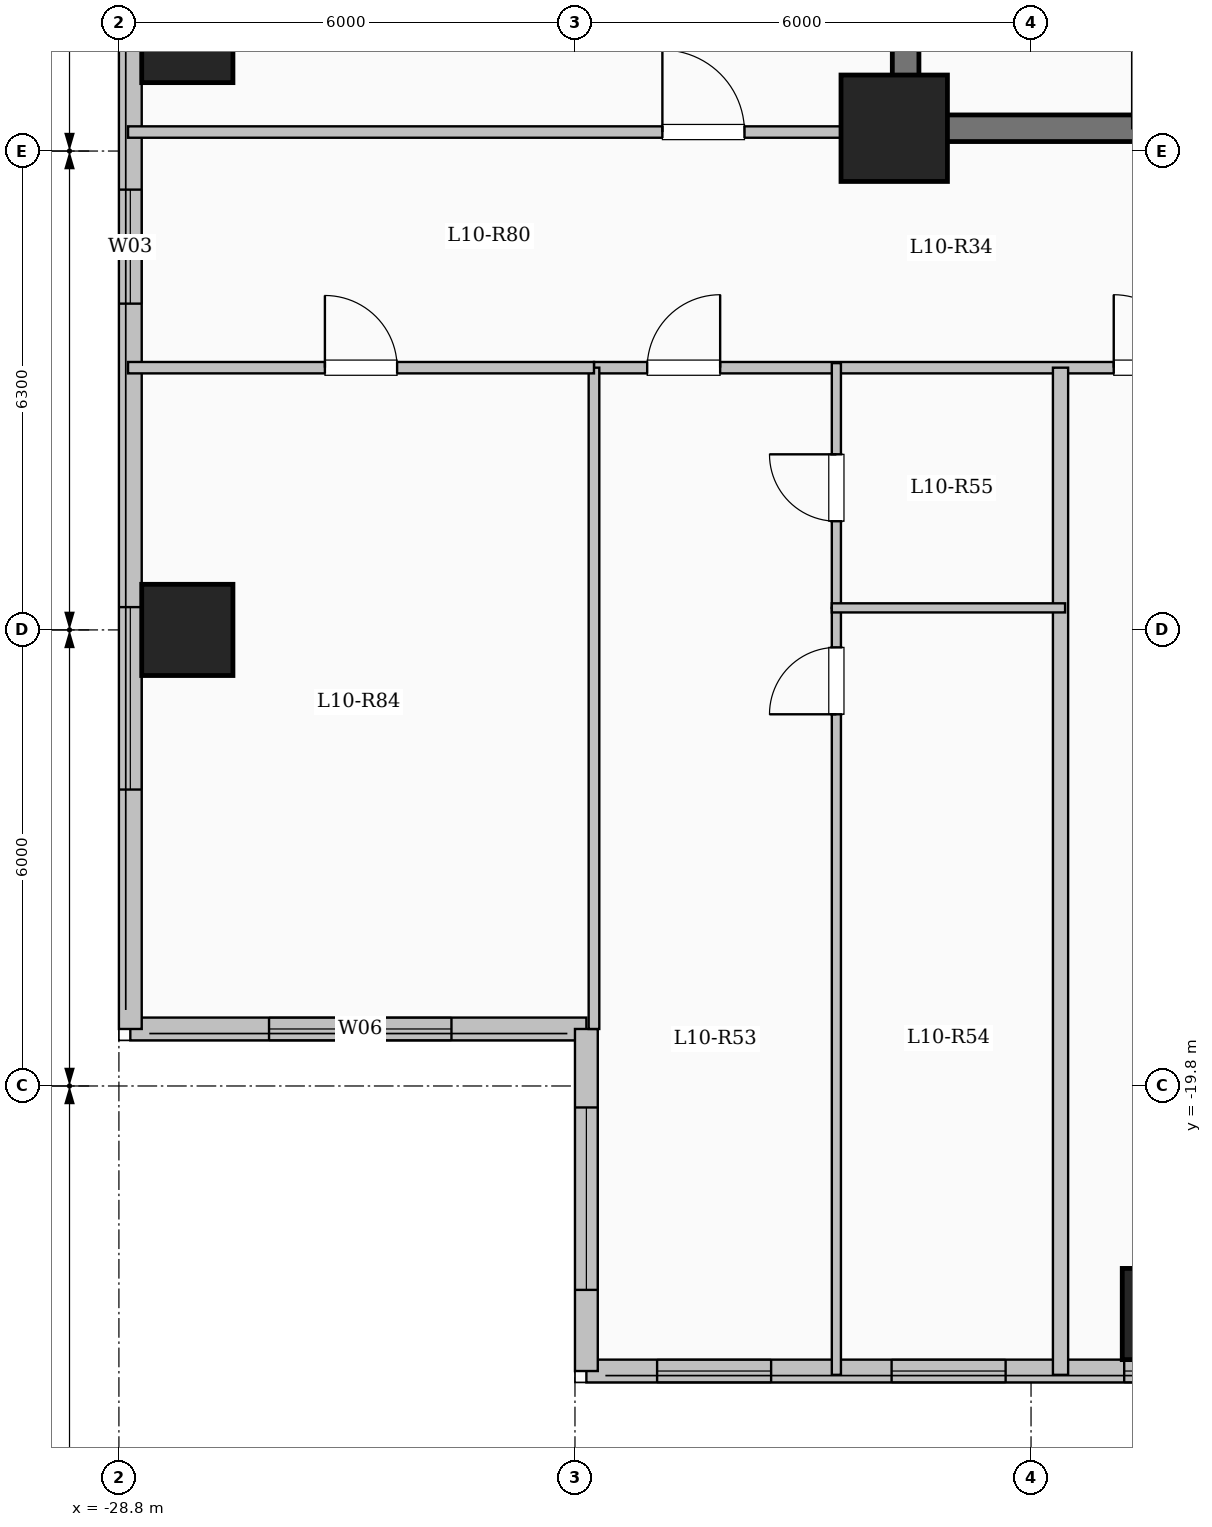
"""IFC4 building model, lengths in metres.
Left out: names, types, materials, properties, quantities, classifications, styles, units other than length and angle.
Written with IfcOpenShell. Run it as: python <this file> out.ifc"""

import sys

from ifc_helpers import new_model, si_unit, direction, frame, frame_2d, origin, origin_2d, place, context, subcontext, project, spatial, rectangle, extrude, element, fill, save


model = new_model("IFC4")
c1 = context("Model", 3, precision=1e-05, world=origin(), true_north=direction((0.0, 1.0)))
c2 = subcontext(c1, "Body", "Model", "MODEL_VIEW")
j1 = project(units=[si_unit("LENGTHUNIT", "METRE"), si_unit("PLANEANGLEUNIT", "RADIAN")], contexts=[c1])
p1 = place(None, origin())
s1 = spatial("IfcSite", under=j1, at=p1, CompositionType="ELEMENT")
p2 = place(p1, origin())
s2 = spatial("IfcBuilding", under=s1, at=p2, CompositionType="ELEMENT")
p3 = place(p2, frame((0.0, 0.0, 40.75)))
s3 = spatial("IfcBuildingStorey", under=s2, at=p3, CompositionType="ELEMENT", Elevation=40.75)
p4 = place(p3, frame((-18.6, -7.2, 0.0), z_axis=(0.0, 0.0, 1.0), x_axis=(1.0, 0.0, 0.0)))
e1 = element("IfcColumn", 1, at=p4, inside=s3, PredefinedType="COLUMN", context=c2, shape_type="SweptSolid", body=[
    extrude(rectangle(XDim=1.4, YDim=1.4, at=origin_2d()), origin(), (0.0, 0.0, 1.0), 3.35),
])
for number, where, z_axis, x_axis in (
    (2, (-15.0, -22.8, 0.0), (0.0, 0.0, 1.0), (1.0, 0.0, 0.0)),
    (3, (-27.9, -13.8, 0.0), (0.0, 0.0, 1.0), (1.0, 0.0, 0.0)),
    (4, (-27.9, -6.0, 0.0), (0.0, 0.0, 1.0), (1.0, 0.0, 0.0)),
):
    element("IfcColumn", number, at=place(p3, frame(where, z_axis=z_axis, x_axis=x_axis)), inside=s3, PredefinedType="COLUMN", context=c2, shape_type="SweptSolid", body=[
        extrude(rectangle(XDim=1.2, YDim=1.2, at=origin_2d()), origin(), (0.0, 0.0, 1.0), 3.35),
    ])
p5 = place(p3, frame((-22.65, -19.05, 0.0), z_axis=(0.0, 0.0, 1.0), x_axis=(-1.0, 0.0, 0.0)))
e5 = element("IfcWall", 5, at=p5, inside=s3, PredefinedType="SOLIDWALL", context=c2, shape_type="SweptSolid", body=[
    extrude(rectangle(XDim=6.0, YDim=0.3, at=frame_2d((3.0, 0.0))), origin(), (0.0, 0.0, 1.0), 3.1),
])
p6 = place(p5, frame((1.775, 0.0, 0.9)))
e6 = element("IfcOpeningElement", 6, at=p6, cuts=e5, PredefinedType="OPENING", context=c2, shape_type="SweptSolid", body=[
    extrude(rectangle(XDim=2.4, YDim=1.8, at=frame_2d((1.2, 0.9))), frame((0.0, 0.16, 0.0), z_axis=(0.0, -1.0, 0.0), x_axis=(1.0, 0.0, 0.0)), (0.0, 0.0, 1.0), 0.32),
])
p7 = place(p3, frame((-28.65, -19.05, 0.0), z_axis=(0.0, 0.0, 1.0), x_axis=(0.0, 1.0, 0.0)))
e7 = element("IfcWall", 7, at=p7, inside=s3, PredefinedType="SOLIDWALL", context=c2, shape_type="SweptSolid", body=[
    extrude(rectangle(XDim=38.1, YDim=0.3, at=frame_2d((19.05, 0.0))), origin(), (0.0, 0.0, 1.0), 3.1),
])
p8 = place(p7, frame((3.15, 0.0, 0.9)))
e8 = element("IfcOpeningElement", 8, at=p8, cuts=e7, PredefinedType="OPENING", context=c2, shape_type="SweptSolid", body=[
    extrude(rectangle(XDim=2.4, YDim=1.8, at=frame_2d((1.2, 0.9))), frame((0.0, 0.16, 0.0), z_axis=(0.0, -1.0, 0.0), x_axis=(1.0, 0.0, 0.0)), (0.0, 0.0, 1.0), 0.32),
])
p9 = place(p7, frame((9.542, 0.0, 0.9)))
e9 = element("IfcOpeningElement", 9, at=p9, cuts=e7, PredefinedType="OPENING", context=c2, shape_type="SweptSolid", body=[
    extrude(rectangle(XDim=1.5, YDim=1.65, at=frame_2d((0.75, 0.825))), frame((0.0, 0.16, 0.0), z_axis=(0.0, -1.0, 0.0), x_axis=(1.0, 0.0, 0.0)), (0.0, 0.0, 1.0), 0.32),
])
p10 = place(p7, frame((19.8, 0.0, 0.9)))
e10 = element("IfcOpeningElement", 10, at=p10, cuts=e7, PredefinedType="OPENING", context=c2, shape_type="SweptSolid", body=[
    extrude(rectangle(XDim=2.0, YDim=1.7, at=frame_2d((1.0, 0.85))), frame((0.0, 0.16, 0.0), z_axis=(0.0, -1.0, 0.0), x_axis=(1.0, 0.0, 0.0)), (0.0, 0.0, 1.0), 0.32),
])
p11 = place(p7, frame((30.175, 0.0, 0.95)))
e11 = element("IfcOpeningElement", 11, at=p11, cuts=e7, PredefinedType="OPENING", context=c2, shape_type="SweptSolid", body=[
    extrude(rectangle(XDim=1.0, YDim=1.5, at=frame_2d((0.5, 0.75))), frame((0.0, 0.16, 0.0), z_axis=(0.0, -1.0, 0.0), x_axis=(1.0, 0.0, 0.0)), (0.0, 0.0, 1.0), 0.32),
])
p12 = place(p7, frame((33.85, 0.0, 0.9)))
e12 = element("IfcOpeningElement", 12, at=p12, cuts=e7, PredefinedType="OPENING", context=c2, shape_type="SweptSolid", body=[
    extrude(rectangle(XDim=2.0, YDim=1.7, at=frame_2d((1.0, 0.85))), frame((0.0, 0.16, 0.0), z_axis=(0.0, -1.0, 0.0), x_axis=(1.0, 0.0, 0.0)), (0.0, 0.0, 1.0), 0.32),
])
p13 = place(p3, frame((-7.35, -23.55, 0.0), z_axis=(0.0, 0.0, 1.0), x_axis=(-1.0, 0.0, 0.0)))
e13 = element("IfcWall", 13, at=p13, inside=s3, PredefinedType="SOLIDWALL", context=c2, shape_type="SweptSolid", body=[
    extrude(rectangle(XDim=15.3, YDim=0.3, at=frame_2d((7.65, 0.0))), origin(), (0.0, 0.0, 1.0), 3.1),
])
p14 = place(p13, frame((0.147, 0.0, 0.95)))
e14 = element("IfcOpeningElement", 14, at=p14, cuts=e13, PredefinedType="OPENING", context=c2, shape_type="SweptSolid", body=[
    extrude(rectangle(XDim=0.85, YDim=1.5, at=frame_2d((0.425, 0.75))), frame((0.0, 0.16, 0.0), z_axis=(0.0, -1.0, 0.0), x_axis=(1.0, 0.0, 0.0)), (0.0, 0.0, 1.0), 0.32),
])
p15 = place(p13, frame((1.808, 0.0, 0.95)))
e15 = element("IfcOpeningElement", 15, at=p15, cuts=e13, PredefinedType="OPENING", context=c2, shape_type="SweptSolid", body=[
    extrude(rectangle(XDim=1.2, YDim=1.5, at=frame_2d((0.6, 0.75))), frame((0.0, 0.16, 0.0), z_axis=(0.0, -1.0, 0.0), x_axis=(1.0, 0.0, 0.0)), (0.0, 0.0, 1.0), 0.32),
])
p16 = place(p13, frame((4.154, 0.0, 0.95)))
e16 = element("IfcOpeningElement", 16, at=p16, cuts=e13, PredefinedType="OPENING", context=c2, shape_type="SweptSolid", body=[
    extrude(rectangle(XDim=1.2, YDim=1.5, at=frame_2d((0.6, 0.75))), frame((0.0, 0.16, 0.0), z_axis=(0.0, -1.0, 0.0), x_axis=(1.0, 0.0, 0.0)), (0.0, 0.0, 1.0), 0.32),
])
p17 = place(p13, frame((6.724, 0.0, 0.9)))
e17 = element("IfcOpeningElement", 17, at=p17, cuts=e13, PredefinedType="OPENING", context=c2, shape_type="SweptSolid", body=[
    extrude(rectangle(XDim=1.5, YDim=1.65, at=frame_2d((0.75, 0.825))), frame((0.0, 0.16, 0.0), z_axis=(0.0, -1.0, 0.0), x_axis=(1.0, 0.0, 0.0)), (0.0, 0.0, 1.0), 0.32),
])
p18 = place(p13, frame((9.784, 0.0, 0.9)))
e18 = element("IfcOpeningElement", 18, at=p18, cuts=e13, PredefinedType="OPENING", context=c2, shape_type="SweptSolid", body=[
    extrude(rectangle(XDim=1.5, YDim=1.65, at=frame_2d((0.75, 0.825))), frame((0.0, 0.16, 0.0), z_axis=(0.0, -1.0, 0.0), x_axis=(1.0, 0.0, 0.0)), (0.0, 0.0, 1.0), 0.32),
])
p19 = place(p13, frame((12.869, 0.0, 0.9)))
e19 = element("IfcOpeningElement", 19, at=p19, cuts=e13, PredefinedType="OPENING", context=c2, shape_type="SweptSolid", body=[
    extrude(rectangle(XDim=1.5, YDim=1.65, at=frame_2d((0.75, 0.825))), frame((0.0, 0.16, 0.0), z_axis=(0.0, -1.0, 0.0), x_axis=(1.0, 0.0, 0.0)), (0.0, 0.0, 1.0), 0.32),
])
p20 = place(p3, frame((-22.65, -23.55, 0.0), z_axis=(0.0, 0.0, 1.0), x_axis=(0.0, 1.0, 0.0)))
e20 = element("IfcWall", 20, at=p20, inside=s3, PredefinedType="SOLIDWALL", context=c2, shape_type="SweptSolid", body=[
    extrude(rectangle(XDim=4.5, YDim=0.3, at=frame_2d((2.25, 0.0))), origin(), (0.0, 0.0, 1.0), 3.1),
])
p21 = place(p20, frame((1.067, 0.0, 0.9)))
e21 = element("IfcOpeningElement", 21, at=p21, cuts=e20, PredefinedType="OPENING", context=c2, shape_type="SweptSolid", body=[
    extrude(rectangle(XDim=2.4, YDim=1.8, at=frame_2d((1.2, 0.9))), frame((0.0, 0.16, 0.0), z_axis=(0.0, -1.0, 0.0), x_axis=(1.0, 0.0, 0.0)), (0.0, 0.0, 1.0), 0.32),
])
p22 = place(p3, frame((-18.45, -7.375, 0.0), z_axis=(0.0, 0.0, 1.0), x_axis=(0.0, 1.0, 0.0)))
e22 = element("IfcWall", 22, at=p22, inside=s3, PredefinedType="SHEAR", context=c2, shape_type="SweptSolid", body=[
    extrude(rectangle(XDim=14.05, YDim=0.35, at=frame_2d((7.025, 0.0))), origin(), (0.0, 0.0, 1.0), 3.35),
])
p23 = place(p3, frame((-18.625, -7.2, 0.0), z_axis=(0.0, 0.0, 1.0), x_axis=(1.0, 0.0, 0.0)))
e23 = element("IfcWall", 23, at=p23, inside=s3, PredefinedType="SHEAR", context=c2, shape_type="SweptSolid", body=[
    extrude(rectangle(XDim=8.55, YDim=0.35, at=frame_2d((4.275, 0.0))), origin(), (0.0, 0.0, 1.0), 3.35),
])
p24 = place(p3, frame((-22.55, -10.35, 0.0), z_axis=(0.0, 0.0, 1.0), x_axis=(1.0, 0.0, 0.0)))
e24 = element("IfcWall", 24, at=p24, inside=s3, PredefinedType="PARTITIONING", context=c2, shape_type="SweptSolid", body=[
    extrude(rectangle(XDim=14.0, YDim=0.15, at=frame_2d((7.0, 0.0))), origin(), (0.0, 0.0, 1.0), 3.1),
])
p25 = place(p24, frame((0.7, 0.0, 0.0)))
e25 = element("IfcOpeningElement", 25, at=p25, cuts=e24, PredefinedType="OPENING", context=c2, shape_type="SweptSolid", body=[
    extrude(rectangle(XDim=0.96, YDim=2.15, at=frame_2d((0.48, 1.075))), frame((0.0, 0.085, 0.0), z_axis=(0.0, -1.0, 0.0), x_axis=(1.0, 0.0, 0.0)), (0.0, 0.0, 1.0), 0.17),
])
p26 = place(p24, frame((6.838, 0.0, 0.0)))
e26 = element("IfcOpeningElement", 26, at=p26, cuts=e24, PredefinedType="OPENING", context=c2, shape_type="SweptSolid", body=[
    extrude(rectangle(XDim=0.96, YDim=2.15, at=frame_2d((0.48, 1.075))), frame((0.0, 0.085, 0.0), z_axis=(0.0, -1.0, 0.0), x_axis=(1.0, 0.0, 0.0)), (0.0, 0.0, 1.0), 0.17),
])
p27 = place(p3, frame((-16.412, -23.6, 0.0), z_axis=(0.0, 0.0, 1.0), x_axis=(0.0, 1.0, 0.0)))
e27 = element("IfcWall", 27, at=p27, inside=s3, PredefinedType="SOLIDWALL", context=c2, shape_type="SweptSolid", body=[
    extrude(rectangle(XDim=13.25, YDim=0.2, at=frame_2d((6.625, 0.0))), origin(), (0.0, 0.0, 1.0), 3.1),
])
p28 = place(p3, frame((-19.361, -23.6, 0.0), z_axis=(0.0, 0.0, 1.0), x_axis=(0.0, 1.0, 0.0)))
e28 = element("IfcWall", 28, at=p28, inside=s3, PredefinedType="PARTITIONING", context=c2, shape_type="SweptSolid", body=[
    extrude(rectangle(XDim=10.09, YDim=0.12, at=frame_2d((5.045, 0.0))), origin(), (0.0, 0.0, 1.0), 3.1),
])
p29 = place(p28, frame((8.69, 0.0, 0.0)))
e29 = element("IfcOpeningElement", 29, at=p29, cuts=e28, PredefinedType="OPENING", context=c2, shape_type="SweptSolid", body=[
    extrude(rectangle(XDim=0.88, YDim=2.1, at=frame_2d((0.44, 1.05))), frame((0.0, 0.07, 0.0), z_axis=(0.0, -1.0, 0.0), x_axis=(1.0, 0.0, 0.0)), (0.0, 0.0, 1.0), 0.14),
])
p30 = place(p3, frame((-19.361, -13.51, 0.0), z_axis=(0.0, 0.0, 1.0), x_axis=(0.0, 1.0, 0.0)))
e30 = element("IfcWall", 30, at=p30, inside=s3, PredefinedType="PARTITIONING", context=c2, shape_type="SweptSolid", body=[
    extrude(rectangle(XDim=3.22, YDim=0.12, at=frame_2d((1.61, 0.0))), origin(), (0.0, 0.0, 1.0), 3.1),
])
p31 = place(p30, frame((1.14, 0.0, 0.0)))
e31 = element("IfcOpeningElement", 31, at=p31, cuts=e30, PredefinedType="OPENING", context=c2, shape_type="SweptSolid", body=[
    extrude(rectangle(XDim=0.88, YDim=2.1, at=frame_2d((0.44, 1.05))), frame((0.0, 0.07, 0.0), z_axis=(0.0, -1.0, 0.0), x_axis=(1.0, 0.0, 0.0)), (0.0, 0.0, 1.0), 0.14),
])
p32 = place(p3, frame((-19.421, -13.51, 0.0), z_axis=(0.0, 0.0, 1.0), x_axis=(1.0, 0.0, 0.0)))
e32 = element("IfcWall", 32, at=p32, inside=s3, PredefinedType="PARTITIONING", context=c2, shape_type="SweptSolid", body=[
    extrude(rectangle(XDim=3.069, YDim=0.12, at=frame_2d((1.534, 0.0))), origin(), (0.0, 0.0, 1.0), 3.1),
])
p33 = place(p3, frame((-28.68, -7.25, 0.0), z_axis=(0.0, 0.0, 1.0), x_axis=(1.0, 0.0, 0.0)))
e33 = element("IfcWall", 33, at=p33, inside=s3, PredefinedType="PARTITIONING", context=c2, shape_type="SweptSolid", body=[
    extrude(rectangle(XDim=10.23, YDim=0.15, at=frame_2d((5.115, 0.0))), origin(), (0.0, 0.0, 1.0), 3.1),
])
p34 = place(p33, frame((7.03, 0.0, 0.0)))
e34 = element("IfcOpeningElement", 34, at=p34, cuts=e33, PredefinedType="OPENING", context=c2, shape_type="SweptSolid", body=[
    extrude(rectangle(XDim=1.08, YDim=2.15, at=frame_2d((0.54, 1.075))), frame((0.0, 0.085, 0.0), z_axis=(0.0, -1.0, 0.0), x_axis=(1.0, 0.0, 0.0)), (0.0, 0.0, 1.0), 0.17),
])
p35 = place(p3, frame((-22.55, -19.05, 0.0), z_axis=(0.0, 0.0, 1.0), x_axis=(0.0, 1.0, 0.0)))
e35 = element("IfcWall", 35, at=p35, inside=s3, PredefinedType="PARTITIONING", context=c2, shape_type="SweptSolid", body=[
    extrude(rectangle(XDim=8.7, YDim=0.14, at=frame_2d((4.35, 0.0))), origin(), (0.0, 0.0, 1.0), 3.1),
])
p36 = place(p3, frame((-28.68, -10.35, 0.0), z_axis=(0.0, 0.0, 1.0), x_axis=(1.0, 0.0, 0.0)))
e36 = element("IfcWall", 36, at=p36, inside=s3, PredefinedType="PARTITIONING", context=c2, shape_type="SweptSolid", body=[
    extrude(rectangle(XDim=6.13, YDim=0.15, at=frame_2d((3.065, 0.0))), origin(), (0.0, 0.0, 1.0), 3.1),
])
p37 = place(p36, frame((2.59, 0.0, 0.0)))
e37 = element("IfcOpeningElement", 37, at=p37, cuts=e36, PredefinedType="OPENING", context=c2, shape_type="SweptSolid", body=[
    extrude(rectangle(XDim=0.95, YDim=2.15, at=frame_2d((0.475, 1.075))), frame((0.0, 0.085, 0.0), z_axis=(0.0, -1.0, 0.0), x_axis=(1.0, 0.0, 0.0)), (0.0, 0.0, 1.0), 0.17),
])
p38 = place(p6, origin())
e38 = element("IfcWindow", 38, at=p38, inside=s3, PartitioningType="SINGLE_PANEL", PredefinedType="WINDOW", context=c2, shape_type="SweptSolid", body=[
    extrude(rectangle(XDim=2.4, YDim=1.8, at=frame_2d((1.2, 0.9))), frame((0.0, 0.03, 0.0), z_axis=(0.0, -1.0, 0.0), x_axis=(1.0, 0.0, 0.0)), (0.0, 0.0, 1.0), 0.06),
])
fill(e6, e38)
p39 = place(p8, origin())
e39 = element("IfcWindow", 39, at=p39, inside=s3, PartitioningType="SINGLE_PANEL", PredefinedType="WINDOW", context=c2, shape_type="SweptSolid", body=[
    extrude(rectangle(XDim=2.4, YDim=1.8, at=frame_2d((1.2, 0.9))), frame((0.0, 0.03, 0.0), z_axis=(0.0, -1.0, 0.0), x_axis=(1.0, 0.0, 0.0)), (0.0, 0.0, 1.0), 0.06),
])
fill(e8, e39)
p40 = place(p9, origin())
e40 = element("IfcWindow", 40, at=p40, inside=s3, PartitioningType="SINGLE_PANEL", PredefinedType="WINDOW", context=c2, shape_type="SweptSolid", body=[
    extrude(rectangle(XDim=1.5, YDim=1.65, at=frame_2d((0.75, 0.825))), frame((0.0, 0.03, 0.0), z_axis=(0.0, -1.0, 0.0), x_axis=(1.0, 0.0, 0.0)), (0.0, 0.0, 1.0), 0.06),
])
fill(e9, e40)
p41 = place(p17, origin())
e41 = element("IfcWindow", 41, at=p41, inside=s3, PartitioningType="SINGLE_PANEL", PredefinedType="WINDOW", context=c2, shape_type="SweptSolid", body=[
    extrude(rectangle(XDim=1.5, YDim=1.65, at=frame_2d((0.75, 0.825))), frame((0.0, 0.03, 0.0), z_axis=(0.0, -1.0, 0.0), x_axis=(1.0, 0.0, 0.0)), (0.0, 0.0, 1.0), 0.06),
])
fill(e17, e41)
p42 = place(p18, origin())
e42 = element("IfcWindow", 42, at=p42, inside=s3, PartitioningType="SINGLE_PANEL", PredefinedType="WINDOW", context=c2, shape_type="SweptSolid", body=[
    extrude(rectangle(XDim=1.5, YDim=1.65, at=frame_2d((0.75, 0.825))), frame((0.0, 0.03, 0.0), z_axis=(0.0, -1.0, 0.0), x_axis=(1.0, 0.0, 0.0)), (0.0, 0.0, 1.0), 0.06),
])
fill(e18, e42)
p43 = place(p19, origin())
e43 = element("IfcWindow", 43, at=p43, inside=s3, PartitioningType="SINGLE_PANEL", PredefinedType="WINDOW", context=c2, shape_type="SweptSolid", body=[
    extrude(rectangle(XDim=1.5, YDim=1.65, at=frame_2d((0.75, 0.825))), frame((0.0, 0.03, 0.0), z_axis=(0.0, -1.0, 0.0), x_axis=(1.0, 0.0, 0.0)), (0.0, 0.0, 1.0), 0.06),
])
fill(e19, e43)
p44 = place(p21, origin())
e44 = element("IfcWindow", 44, at=p44, inside=s3, PartitioningType="SINGLE_PANEL", PredefinedType="WINDOW", context=c2, shape_type="SweptSolid", body=[
    extrude(rectangle(XDim=2.4, YDim=1.8, at=frame_2d((1.2, 0.9))), frame((0.0, 0.03, 0.0), z_axis=(0.0, -1.0, 0.0), x_axis=(1.0, 0.0, 0.0)), (0.0, 0.0, 1.0), 0.06),
])
fill(e21, e44)
p45 = place(p25, origin())
e45 = element("IfcDoor", 45, at=p45, inside=s3, OperationType="SINGLE_SWING_RIGHT", PredefinedType="DOOR", context=c2, shape_type="SweptSolid", body=[
    extrude(rectangle(XDim=0.96, YDim=2.15, at=frame_2d((0.48, 1.075))), frame((0.0, 0.025, 0.0), z_axis=(0.0, -1.0, 0.0), x_axis=(1.0, 0.0, 0.0)), (0.0, 0.0, 1.0), 0.05),
])
fill(e25, e45)
p46 = place(p29, origin())
e46 = element("IfcDoor", 46, at=p46, inside=s3, OperationType="SINGLE_SWING_LEFT", PredefinedType="DOOR", context=c2, shape_type="SweptSolid", body=[
    extrude(rectangle(XDim=0.88, YDim=2.1, at=frame_2d((0.44, 1.05))), frame((0.0, 0.025, 0.0), z_axis=(0.0, -1.0, 0.0), x_axis=(1.0, 0.0, 0.0)), (0.0, 0.0, 1.0), 0.05),
])
fill(e29, e46)
p47 = place(p31, origin())
e47 = element("IfcDoor", 47, at=p47, inside=s3, OperationType="SINGLE_SWING_RIGHT", PredefinedType="DOOR", context=c2, shape_type="SweptSolid", body=[
    extrude(rectangle(XDim=0.88, YDim=2.1, at=frame_2d((0.44, 1.05))), frame((0.0, 0.025, 0.0), z_axis=(0.0, -1.0, 0.0), x_axis=(1.0, 0.0, 0.0)), (0.0, 0.0, 1.0), 0.05),
])
fill(e31, e47)
p48 = place(p26, origin())
e48 = element("IfcDoor", 48, at=p48, inside=s3, OperationType="SINGLE_SWING_LEFT", PredefinedType="DOOR", context=c2, shape_type="SweptSolid", body=[
    extrude(rectangle(XDim=0.96, YDim=2.15, at=frame_2d((0.48, 1.075))), frame((0.0, 0.025, 0.0), z_axis=(0.0, -1.0, 0.0), x_axis=(1.0, 0.0, 0.0)), (0.0, 0.0, 1.0), 0.05),
])
fill(e26, e48)
p49 = place(p37, origin())
e49 = element("IfcDoor", 49, at=p49, inside=s3, OperationType="SINGLE_SWING_LEFT", PredefinedType="DOOR", context=c2, shape_type="SweptSolid", body=[
    extrude(rectangle(XDim=0.95, YDim=2.15, at=frame_2d((0.475, 1.075))), frame((0.0, 0.025, 0.0), z_axis=(0.0, -1.0, 0.0), x_axis=(1.0, 0.0, 0.0)), (0.0, 0.0, 1.0), 0.05),
])
fill(e37, e49)
p50 = place(p34, origin())
e50 = element("IfcDoor", 50, at=p50, inside=s3, OperationType="SINGLE_SWING_LEFT", PredefinedType="DOOR", context=c2, shape_type="SweptSolid", body=[
    extrude(rectangle(XDim=1.08, YDim=2.15, at=frame_2d((0.54, 1.075))), frame((0.0, 0.025, 0.0), z_axis=(0.0, -1.0, 0.0), x_axis=(1.0, 0.0, 0.0)), (0.0, 0.0, 1.0), 0.05),
])
fill(e34, e50)
save(model, sys.argv[1])
